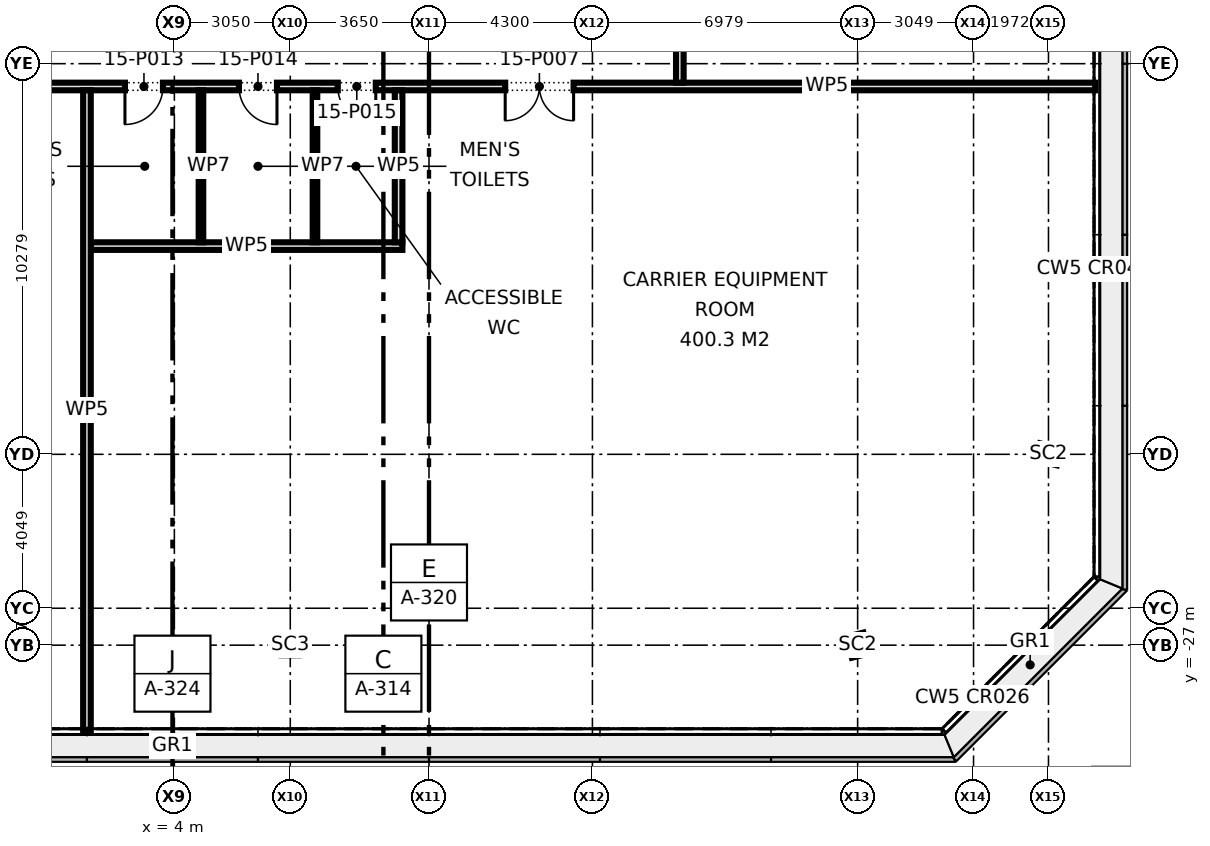
"""IFC4 building model, lengths in metres.
Left out: names, types, materials, properties, quantities, classifications, styles, units other than length and angle.
Written with IfcOpenShell. Run it as: python <this file> out.ifc"""

import sys

from ifc_helpers import new_model, si_unit, direction, frame, frame_2d, origin, origin_2d, place, context, subcontext, project, spatial, rectangle, i_section, extrude, element, fill, save


model = new_model("IFC4")
c1 = context("Model", 3, precision=1e-05, world=origin(), true_north=direction((0.0, 1.0)))
c2 = subcontext(c1, "Body", "Model", "MODEL_VIEW")
j1 = project(units=[si_unit("LENGTHUNIT", "METRE"), si_unit("PLANEANGLEUNIT", "RADIAN")], contexts=[c1])
p1 = place(None, origin())
s1 = spatial("IfcSite", under=j1, at=p1, CompositionType="ELEMENT")
p2 = place(p1, origin())
s2 = spatial("IfcBuilding", under=s1, at=p2, CompositionType="ELEMENT")
p3 = place(p2, frame((0.0, 0.0, 68.6)))
s3 = spatial("IfcBuildingStorey", under=s2, at=p3, CompositionType="ELEMENT", Elevation=68.6)
p4 = place(p3, frame((7.05, -27.0, 0.0), z_axis=(0.0, 0.0, 1.0), x_axis=(1.0, 0.0, 0.0)))
e1 = element("IfcColumn", 1, at=p4, inside=s3, PredefinedType="COLUMN", context=c2, shape_type="SweptSolid", body=[
    extrude(i_section(OverallWidth=0.442, OverallDepth=0.531, WebThickness=0.066, FlangeThickness=0.106, FilletRadius=0.015, at=origin_2d()), origin(), (0.0, 0.0, 1.0), 3.407),
])
for number, where, z_axis, x_axis in (
    (2, (21.979, -27.0, 0.0), (0.0, 0.0, 1.0), (0.97, 0.244, 0.0)),
    (3, (27.0, -21.979, 0.0), (0.0, 0.0, 1.0), (0.244, 0.97, 0.0)),
):
    element("IfcColumn", number, at=place(p3, frame(where, z_axis=z_axis, x_axis=x_axis)), inside=s3, PredefinedType="COLUMN", context=c2, shape_type="SweptSolid", body=[
        extrude(i_section(OverallWidth=0.455, OverallDepth=0.569, WebThickness=0.078, FlangeThickness=0.125, FilletRadius=0.015, at=origin_2d()), origin(), (0.0, 0.0, 1.0), 3.407),
    ])
p5 = place(p3, frame((1.8, -16.5, 0.0), z_axis=(0.0, 0.0, 1.0), x_axis=(1.0, 0.0, 0.0)))
e4 = element("IfcWall", 4, at=p5, inside=s3, PredefinedType="PARTITIONING", context=c2, shape_type="SweptSolid", body=[
    extrude(rectangle(XDim=8.2, YDim=0.2, at=frame_2d((4.1, 0.0))), origin(), (0.0, 0.0, 1.0), 4.4),
])
p6 = place(p3, frame((-20.33, -12.3, 0.0), z_axis=(0.0, 0.0, 1.0), x_axis=(1.0, 0.0, 0.0)))
e5 = element("IfcWall", 5, at=p6, inside=s3, PredefinedType="PARTITIONING", context=c2, shape_type="SweptSolid", body=[
    extrude(rectangle(XDim=48.56, YDim=0.2, at=frame_2d((24.28, 0.0))), origin(), (0.0, 0.0, 1.0), 4.4),
])
p7 = place(p6, frame((5.64, 0.0, 0.0)))
e6 = element("IfcOpeningElement", 6, at=p7, cuts=e5, PredefinedType="OPENING", context=c2, shape_type="SweptSolid", body=[
    extrude(rectangle(XDim=1.8, YDim=2.1, at=frame_2d((0.9, 1.05))), frame((0.0, 0.11, 0.0), z_axis=(0.0, -1.0, 0.0), x_axis=(1.0, 0.0, 0.0)), (0.0, 0.0, 1.0), 0.22),
])
p8 = place(p6, frame((16.93, 0.0, 0.0)))
e7 = element("IfcOpeningElement", 7, at=p8, cuts=e5, PredefinedType="OPENING", context=c2, shape_type="SweptSolid", body=[
    extrude(rectangle(XDim=1.2, YDim=2.1, at=frame_2d((0.6, 1.05))), frame((0.0, 0.11, 0.0), z_axis=(0.0, -1.0, 0.0), x_axis=(1.0, 0.0, 0.0)), (0.0, 0.0, 1.0), 0.22),
])
p9 = place(p6, frame((33.035, 0.0, 0.0)))
e8 = element("IfcOpeningElement", 8, at=p9, cuts=e5, PredefinedType="OPENING", context=c2, shape_type="SweptSolid", body=[
    extrude(rectangle(XDim=1.8, YDim=2.1, at=frame_2d((0.9, 1.05))), frame((0.0, 0.11, 0.0), z_axis=(0.0, -1.0, 0.0), x_axis=(1.0, 0.0, 0.0)), (0.0, 0.0, 1.0), 0.22),
])
p10 = place(p6, frame((23.03, 0.0, 0.0)))
e9 = element("IfcOpeningElement", 9, at=p10, cuts=e5, PredefinedType="OPENING", context=c2, shape_type="SweptSolid", body=[
    extrude(rectangle(XDim=1.0, YDim=2.1, at=frame_2d((0.5, 1.05))), frame((0.0, 0.11, 0.0), z_axis=(0.0, -1.0, 0.0), x_axis=(1.0, 0.0, 0.0)), (0.0, 0.0, 1.0), 0.22),
])
p11 = place(p6, frame((26.03, 0.0, 0.0)))
e10 = element("IfcOpeningElement", 10, at=p11, cuts=e5, PredefinedType="OPENING", context=c2, shape_type="SweptSolid", body=[
    extrude(rectangle(XDim=1.0, YDim=2.1, at=frame_2d((0.5, 1.05))), frame((0.0, 0.11, 0.0), z_axis=(0.0, -1.0, 0.0), x_axis=(1.0, 0.0, 0.0)), (0.0, 0.0, 1.0), 0.22),
])
p12 = place(p6, frame((28.63, 0.0, 0.0)))
e11 = element("IfcOpeningElement", 11, at=p12, cuts=e5, PredefinedType="OPENING", context=c2, shape_type="SweptSolid", body=[
    extrude(rectangle(XDim=1.0, YDim=2.1, at=frame_2d((0.5, 1.05))), frame((0.0, 0.11, 0.0), z_axis=(0.0, -1.0, 0.0), x_axis=(1.0, 0.0, 0.0)), (0.0, 0.0, 1.0), 0.22),
])
p13 = place(p3, frame((17.3, -12.2, 0.0), z_axis=(0.0, 0.0, 1.0), x_axis=(0.0, 1.0, 0.0)))
e12 = element("IfcWall", 12, at=p13, inside=s3, PredefinedType="PARTITIONING", context=c2, shape_type="SweptSolid", body=[
    extrude(rectangle(XDim=24.4, YDim=0.2, at=frame_2d((12.2, 0.0))), origin(), (0.0, 0.0, 1.0), 4.4),
])
p14 = place(p13, frame((6.35, 0.0, 0.0)))
e13 = element("IfcOpeningElement", 13, at=p14, cuts=e12, PredefinedType="OPENING", context=c2, shape_type="SweptSolid", body=[
    extrude(rectangle(XDim=1.2, YDim=2.1, at=frame_2d((0.6, 1.05))), frame((0.0, 0.11, 0.0), z_axis=(0.0, -1.0, 0.0), x_axis=(1.0, 0.0, 0.0)), (0.0, 0.0, 1.0), 0.22),
])
p15 = place(p13, frame((17.6, 0.0, 0.0)))
e14 = element("IfcOpeningElement", 14, at=p15, cuts=e12, PredefinedType="OPENING", context=c2, shape_type="SweptSolid", body=[
    extrude(rectangle(XDim=1.8, YDim=2.1, at=frame_2d((0.9, 1.05))), frame((0.0, 0.11, 0.0), z_axis=(0.0, -1.0, 0.0), x_axis=(1.0, 0.0, 0.0)), (0.0, 0.0, 1.0), 0.22),
])
p16 = place(p3, frame((9.9, -16.4, 0.0), z_axis=(0.0, 0.0, 1.0), x_axis=(0.0, 1.0, 0.0)))
e15 = element("IfcWall", 15, at=p16, inside=s3, PredefinedType="PARTITIONING", context=c2, shape_type="SweptSolid", body=[
    extrude(rectangle(XDim=4.0, YDim=0.2, at=frame_2d((2.0, 0.0))), origin(), (0.0, 0.0, 1.0), 4.4),
])
p17 = place(p3, frame((1.7, -29.23, 0.0), z_axis=(0.0, 0.0, 1.0), x_axis=(0.0, 1.0, 0.0)))
e16 = element("IfcWall", 16, at=p17, inside=s3, PredefinedType="PARTITIONING", context=c2, shape_type="SweptSolid", body=[
    extrude(rectangle(XDim=16.83, YDim=0.2, at=frame_2d((8.415, 0.0))), origin(), (0.0, 0.0, 1.0), 4.4),
])
for number, where, z_axis, x_axis in (
    (17, (7.7, -16.4, 0.0), (0.0, 0.0, 1.0), (0.0, 1.0, 0.0)),
    (18, (4.7, -16.4, 0.0), (0.0, 0.0, 1.0), (0.0, 1.0, 0.0)),
):
    element("IfcWall", number, at=place(p3, frame(where, z_axis=z_axis, x_axis=x_axis)), inside=s3, PredefinedType="PARTITIONING", context=c2, shape_type="SweptSolid", body=[
        extrude(rectangle(XDim=4.0, YDim=0.12, at=frame_2d((2.0, 0.0))), origin(), (0.0, 0.0, 1.0), 4.4),
    ])
p18 = place(p9, frame((1.8, 0.0, 0.0), z_axis=(0.0, 0.0, 1.0), x_axis=(-1.0, 0.0, 0.0)))
e19 = element("IfcDoor", 19, at=p18, inside=s3, OperationType="DOUBLE_DOOR_SINGLE_SWING", PredefinedType="DOOR", context=c2, shape_type="SweptSolid", body=[
    extrude(rectangle(XDim=1.8, YDim=2.1, at=frame_2d((0.9, 1.05))), frame((0.0, 0.025, 0.0), z_axis=(0.0, -1.0, 0.0), x_axis=(1.0, 0.0, 0.0)), (0.0, 0.0, 1.0), 0.05),
])
fill(e8, e19)
p19 = place(p10, frame((1.0, 0.0, 0.0), z_axis=(0.0, 0.0, 1.0), x_axis=(-1.0, 0.0, 0.0)))
e20 = element("IfcDoor", 20, at=p19, inside=s3, OperationType="SINGLE_SWING_RIGHT", PredefinedType="DOOR", context=c2, shape_type="SweptSolid", body=[
    extrude(rectangle(XDim=1.0, YDim=2.1, at=frame_2d((0.5, 1.05))), frame((0.0, 0.025, 0.0), z_axis=(0.0, -1.0, 0.0), x_axis=(1.0, 0.0, 0.0)), (0.0, 0.0, 1.0), 0.05),
])
fill(e9, e20)
p20 = place(p11, frame((1.0, 0.0, 0.0), z_axis=(0.0, 0.0, 1.0), x_axis=(-1.0, 0.0, 0.0)))
e21 = element("IfcDoor", 21, at=p20, inside=s3, OperationType="SINGLE_SWING_LEFT", PredefinedType="DOOR", context=c2, shape_type="SweptSolid", body=[
    extrude(rectangle(XDim=1.0, YDim=2.1, at=frame_2d((0.5, 1.05))), frame((0.0, 0.025, 0.0), z_axis=(0.0, -1.0, 0.0), x_axis=(1.0, 0.0, 0.0)), (0.0, 0.0, 1.0), 0.05),
])
fill(e10, e21)
p21 = place(p12, frame((1.0, 0.0, 0.0), z_axis=(0.0, 0.0, 1.0), x_axis=(-1.0, 0.0, 0.0)))
e22 = element("IfcDoor", 22, at=p21, inside=s3, OperationType="SINGLE_SWING_LEFT", PredefinedType="DOOR", context=c2, shape_type="SweptSolid", body=[
    extrude(rectangle(XDim=1.0, YDim=2.1, at=frame_2d((0.5, 1.05))), frame((0.0, 0.025, 0.0), z_axis=(0.0, -1.0, 0.0), x_axis=(1.0, 0.0, 0.0)), (0.0, 0.0, 1.0), 0.05),
])
fill(e11, e22)
save(model, sys.argv[1])
